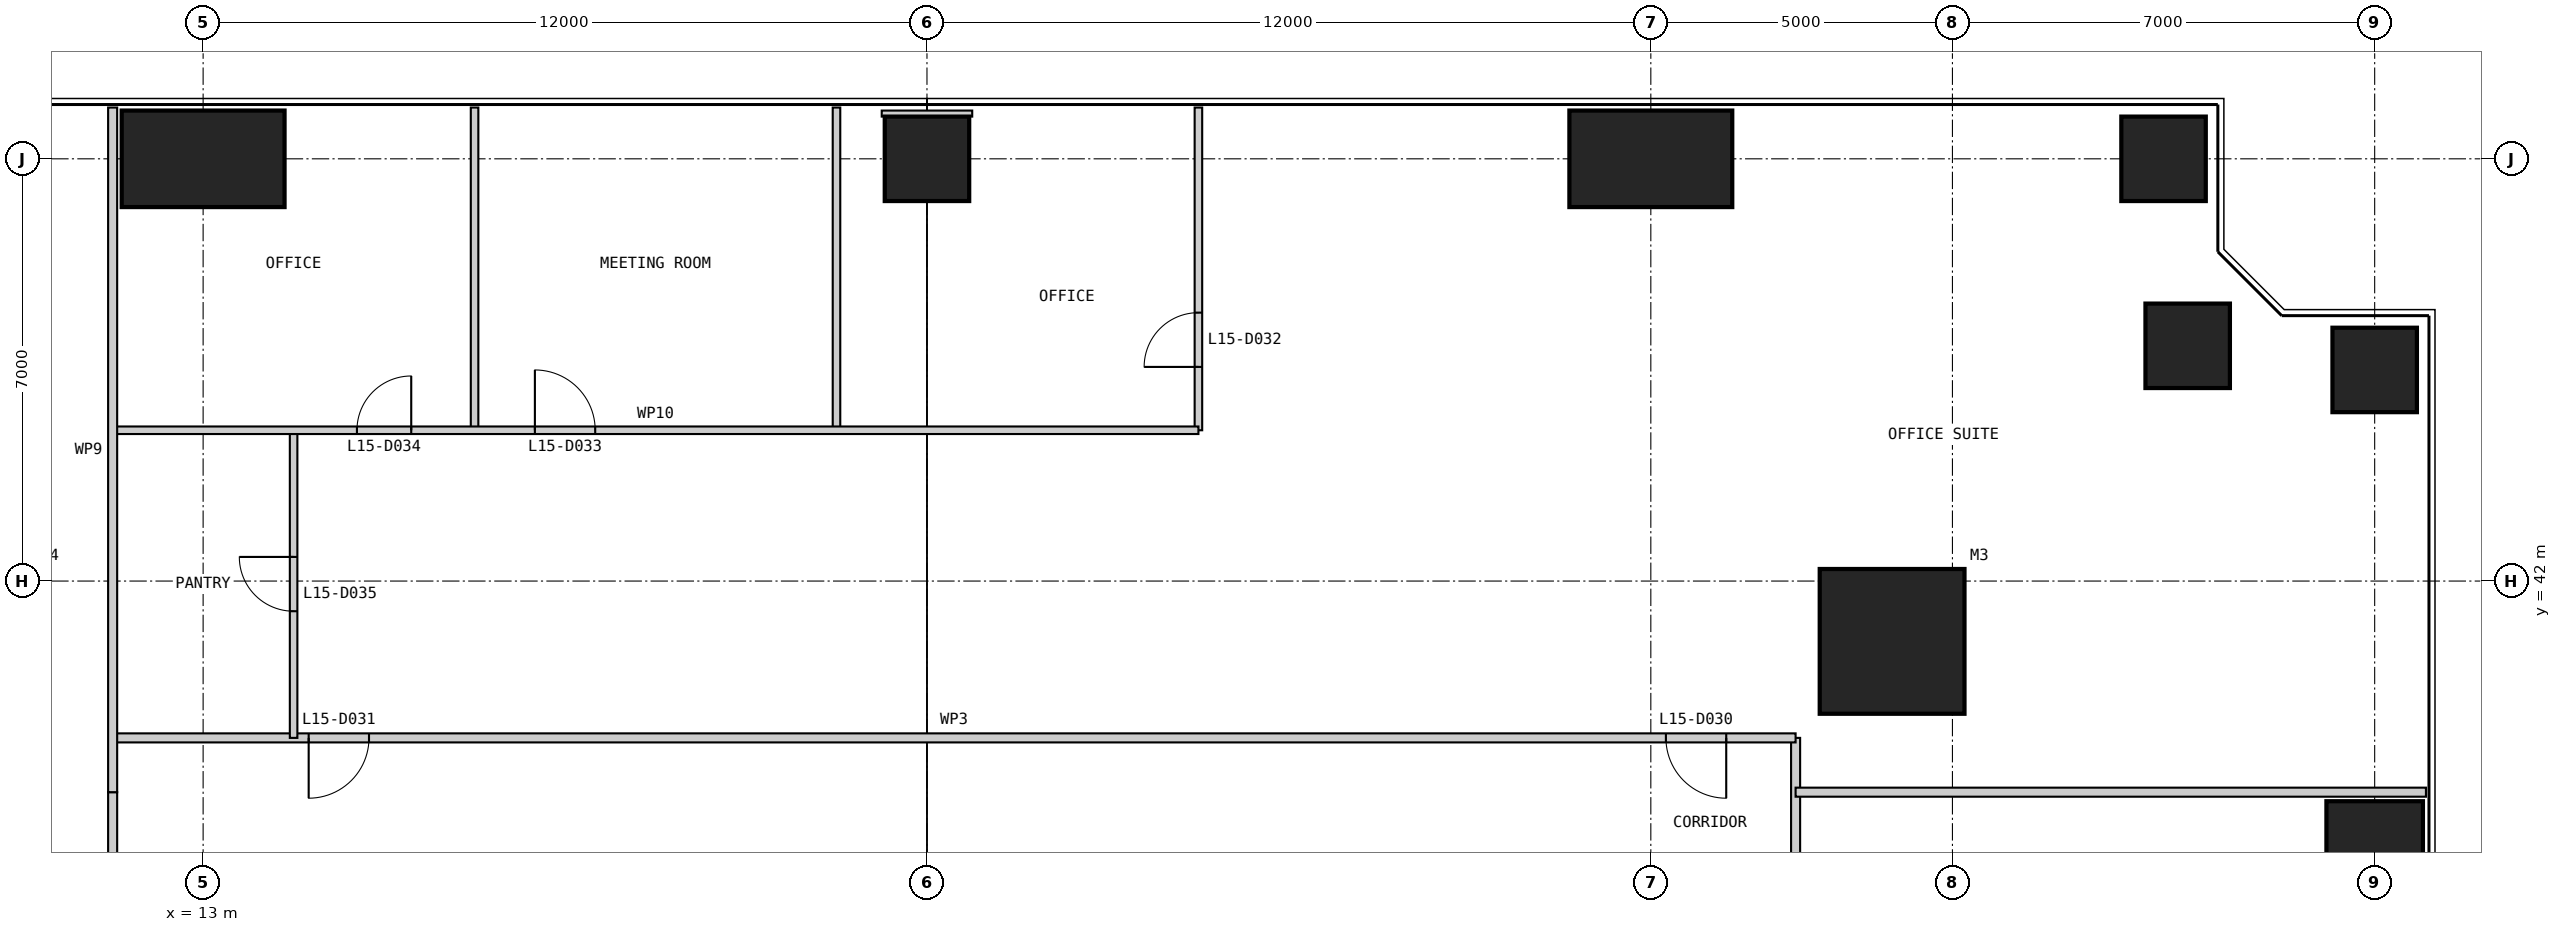
"""IFC4 building model, lengths in metres.
Left out: names, types, materials, properties, quantities, classifications, styles, units other than length and angle.
Written with IfcOpenShell. Run it as: python <this file> out.ifc"""

import sys

from ifc_helpers import new_model, si_unit, direction, frame, frame_2d, origin, origin_2d, place, context, subcontext, project, spatial, rectangle, extrude, element, fill, save


model = new_model("IFC4")
c1 = context("Model", 3, precision=1e-05, world=origin(), true_north=direction((0.0, 1.0)))
c2 = subcontext(c1, "Body", "Model", "MODEL_VIEW")
j1 = project(units=[si_unit("LENGTHUNIT", "METRE"), si_unit("PLANEANGLEUNIT", "RADIAN")], contexts=[c1])
p1 = place(None, origin())
s1 = spatial("IfcSite", under=j1, at=p1, CompositionType="ELEMENT")
p2 = place(p1, origin())
s2 = spatial("IfcBuilding", under=s1, at=p2, CompositionType="ELEMENT")
p3 = place(p2, frame((0.0, 0.0, 67.0)))
s3 = spatial("IfcBuildingStorey", under=s2, at=p3, CompositionType="ELEMENT", Elevation=67.0)
p4 = place(p3, frame((41.0, 41.0, 0.0), z_axis=(0.0, 0.0, 1.0), x_axis=(1.0, 0.0, 0.0)))
e1 = element("IfcColumn", 1, at=p4, inside=s3, PredefinedType="COLUMN", context=c2, shape_type="SweptSolid", body=[
    extrude(rectangle(XDim=2.4, YDim=2.4, at=origin_2d()), origin(), (0.0, 0.0, 1.0), 4.0),
])
p5 = place(p3, frame((49.0, 37.0, 0.0), z_axis=(0.0, 0.0, 1.0), x_axis=(1.0, 0.0, 0.0)))
e2 = element("IfcColumn", 2, at=p5, inside=s3, PredefinedType="COLUMN", context=c2, shape_type="SweptSolid", body=[
    extrude(rectangle(XDim=1.6, YDim=2.7, at=origin_2d()), origin(), (0.0, 0.0, 1.0), 4.0),
])
for number, where, z_axis, x_axis in (
    (3, (49.0, 45.5, 0.0), (0.0, 0.0, 1.0), (1.0, 0.0, 0.0)),
    (4, (45.9, 45.9, 0.0), (0.0, 0.0, 1.0), (1.0, 0.0, 0.0)),
    (5, (45.5, 49.0, 0.0), (0.0, 0.0, 1.0), (1.0, 0.0, 0.0)),
):
    element("IfcColumn", number, at=place(p3, frame(where, z_axis=z_axis, x_axis=x_axis)), inside=s3, PredefinedType="COLUMN", context=c2, shape_type="SweptSolid", body=[
        extrude(rectangle(XDim=1.4, YDim=1.4, at=origin_2d()), origin(), (0.0, 0.0, 1.0), 4.0),
    ])
p6 = place(p3, frame((37.0, 49.0, 0.0), z_axis=(0.0, 0.0, 1.0), x_axis=(1.0, 0.0, 0.0)))
e6 = element("IfcColumn", 6, at=p6, inside=s3, PredefinedType="COLUMN", context=c2, shape_type="SweptSolid", body=[
    extrude(rectangle(XDim=2.7, YDim=1.6, at=origin_2d()), origin(), (0.0, 0.0, 1.0), 4.0),
])
p7 = place(p3, frame((25.0, 49.0, 0.0), z_axis=(0.0, 0.0, 1.0), x_axis=(1.0, 0.0, 0.0)))
e7 = element("IfcColumn", 7, at=p7, inside=s3, PredefinedType="COLUMN", context=c2, shape_type="SweptSolid", body=[
    extrude(rectangle(XDim=1.4, YDim=1.4, at=origin_2d()), origin(), (0.0, 0.0, 1.0), 4.0),
])
p8 = place(p3, frame((13.0, 49.0, 0.0), z_axis=(0.0, 0.0, 1.0), x_axis=(1.0, 0.0, 0.0)))
e8 = element("IfcColumn", 8, at=p8, inside=s3, PredefinedType="COLUMN", context=c2, shape_type="SweptSolid", body=[
    extrude(rectangle(XDim=2.7, YDim=1.6, at=origin_2d()), origin(), (0.0, 0.0, 1.0), 4.0),
])
p9 = place(p3, frame((39.4, 11.5, 0.0), z_axis=(0.0, 0.0, 1.0), x_axis=(0.0, 1.0, 0.0)))
e9 = element("IfcWall", 9, at=p9, inside=s3, PredefinedType="PARTITIONING", context=c2, shape_type="SweptSolid", body=[
    extrude(rectangle(XDim=27.9, YDim=0.15, at=frame_2d((13.95, 0.0))), origin(), (0.0, 0.0, 1.0), 3.85),
])
p10 = place(p9, frame((2.5, 0.0, 0.0)))
e10 = element("IfcOpeningElement", 10, at=p10, cuts=e9, PredefinedType="OPENING", context=c2, shape_type="SweptSolid", body=[
    extrude(rectangle(XDim=1.0, YDim=2.2, at=frame_2d((0.5, 1.1))), frame((0.0, 0.085, 0.0), z_axis=(0.0, -1.0, 0.0), x_axis=(1.0, 0.0, 0.0)), (0.0, 0.0, 1.0), 0.17),
])
p11 = place(p9, frame((9.25, 0.0, 0.0)))
e11 = element("IfcOpeningElement", 11, at=p11, cuts=e9, PredefinedType="OPENING", context=c2, shape_type="SweptSolid", body=[
    extrude(rectangle(XDim=1.0, YDim=2.2, at=frame_2d((0.5, 1.1))), frame((0.0, 0.085, 0.0), z_axis=(0.0, -1.0, 0.0), x_axis=(1.0, 0.0, 0.0)), (0.0, 0.0, 1.0), 0.17),
])
p12 = place(p9, frame((16.75, 0.0, 0.0)))
e12 = element("IfcOpeningElement", 12, at=p12, cuts=e9, PredefinedType="OPENING", context=c2, shape_type="SweptSolid", body=[
    extrude(rectangle(XDim=1.0, YDim=2.2, at=frame_2d((0.5, 1.1))), frame((0.0, 0.085, 0.0), z_axis=(0.0, -1.0, 0.0), x_axis=(1.0, 0.0, 0.0)), (0.0, 0.0, 1.0), 0.17),
])
p13 = place(p9, frame((23.5, 0.0, 0.0)))
e13 = element("IfcOpeningElement", 13, at=p13, cuts=e9, PredefinedType="OPENING", context=c2, shape_type="SweptSolid", body=[
    extrude(rectangle(XDim=1.0, YDim=2.2, at=frame_2d((0.5, 1.1))), frame((0.0, 0.085, 0.0), z_axis=(0.0, -1.0, 0.0), x_axis=(1.0, 0.0, 0.0)), (0.0, 0.0, 1.0), 0.17),
])
p14 = place(p3, frame((39.4, 39.4, 0.0), z_axis=(0.0, 0.0, 1.0), x_axis=(-1.0, 0.0, 0.0)))
e14 = element("IfcWall", 14, at=p14, inside=s3, PredefinedType="PARTITIONING", context=c2, shape_type="SweptSolid", body=[
    extrude(rectangle(XDim=27.9, YDim=0.15, at=frame_2d((13.95, 0.0))), origin(), (0.0, 0.0, 1.0), 3.85),
])
p15 = place(p14, frame((1.15, 0.0, 0.0)))
e15 = element("IfcOpeningElement", 15, at=p15, cuts=e14, PredefinedType="OPENING", context=c2, shape_type="SweptSolid", body=[
    extrude(rectangle(XDim=1.0, YDim=2.2, at=frame_2d((0.5, 1.1))), frame((0.0, 0.085, 0.0), z_axis=(0.0, -1.0, 0.0), x_axis=(1.0, 0.0, 0.0)), (0.0, 0.0, 1.0), 0.17),
])
p16 = place(p14, frame((23.65, 0.0, 0.0)))
e16 = element("IfcOpeningElement", 16, at=p16, cuts=e14, PredefinedType="OPENING", context=c2, shape_type="SweptSolid", body=[
    extrude(rectangle(XDim=1.0, YDim=2.2, at=frame_2d((0.5, 1.1))), frame((0.0, 0.085, 0.0), z_axis=(0.0, -1.0, 0.0), x_axis=(1.0, 0.0, 0.0)), (0.0, 0.0, 1.0), 0.17),
])
p17 = place(p3, frame((49.85, 38.5, 0.0), z_axis=(0.0, 0.0, 1.0), x_axis=(-1.0, 0.0, 0.0)))
e17 = element("IfcWall", 17, at=p17, inside=s3, PredefinedType="PARTITIONING", context=c2, shape_type="SweptSolid", body=[
    extrude(rectangle(XDim=10.45, YDim=0.15, at=frame_2d((5.225, 0.0))), origin(), (0.0, 0.0, 1.0), 3.85),
])
p18 = place(p3, frame((29.5, 49.85, 0.0), z_axis=(0.0, 0.0, 1.0), x_axis=(0.0, -1.0, 0.0)))
e18 = element("IfcWall", 18, at=p18, inside=s3, PredefinedType="PARTITIONING", context=c2, shape_type="SweptSolid", body=[
    extrude(rectangle(XDim=5.35, YDim=0.125, at=frame_2d((2.675, 0.0))), origin(), (0.0, 0.0, 1.0), 3.85),
])
p19 = place(p18, frame((3.4, 0.0, 0.0)))
e19 = element("IfcOpeningElement", 19, at=p19, cuts=e18, PredefinedType="OPENING", context=c2, shape_type="SweptSolid", body=[
    extrude(rectangle(XDim=0.9, YDim=2.2, at=frame_2d((0.45, 1.1))), frame((0.0, 0.073, 0.0), z_axis=(0.0, -1.0, 0.0), x_axis=(1.0, 0.0, 0.0)), (0.0, 0.0, 1.0), 0.145),
])
for number, where, z_axis, x_axis in (
    (20, (23.5, 49.85, 0.0), (0.0, 0.0, 1.0), (0.0, -1.0, 0.0)),
    (21, (17.5, 49.85, 0.0), (0.0, 0.0, 1.0), (0.0, -1.0, 0.0)),
):
    element("IfcWall", number, at=place(p3, frame(where, z_axis=z_axis, x_axis=x_axis)), inside=s3, PredefinedType="PARTITIONING", context=c2, shape_type="SweptSolid", body=[
        extrude(rectangle(XDim=5.35, YDim=0.125, at=frame_2d((2.675, 0.0))), origin(), (0.0, 0.0, 1.0), 3.85),
    ])
p20 = place(p3, frame((14.5, 44.5, 0.0), z_axis=(0.0, 0.0, 1.0), x_axis=(0.0, -1.0, 0.0)))
e22 = element("IfcWall", 22, at=p20, inside=s3, PredefinedType="PARTITIONING", context=c2, shape_type="SweptSolid", body=[
    extrude(rectangle(XDim=5.1, YDim=0.125, at=frame_2d((2.55, 0.0))), origin(), (0.0, 0.0, 1.0), 3.85),
])
p21 = place(p20, frame((2.1, 0.0, 0.0)))
e23 = element("IfcOpeningElement", 23, at=p21, cuts=e22, PredefinedType="OPENING", context=c2, shape_type="SweptSolid", body=[
    extrude(rectangle(XDim=0.9, YDim=2.2, at=frame_2d((0.45, 1.1))), frame((0.0, 0.073, 0.0), z_axis=(0.0, -1.0, 0.0), x_axis=(1.0, 0.0, 0.0)), (0.0, 0.0, 1.0), 0.145),
])
p22 = place(p3, frame((29.5, 44.5, 0.0), z_axis=(0.0, 0.0, 1.0), x_axis=(-1.0, 0.0, 0.0)))
e24 = element("IfcWall", 24, at=p22, inside=s3, PredefinedType="PARTITIONING", context=c2, shape_type="SweptSolid", body=[
    extrude(rectangle(XDim=18.0, YDim=0.125, at=frame_2d((9.0, 0.0))), origin(), (0.0, 0.0, 1.0), 3.85),
])
p23 = place(p22, frame((10.0, 0.0, 0.0)))
e25 = element("IfcOpeningElement", 25, at=p23, cuts=e24, PredefinedType="OPENING", context=c2, shape_type="SweptSolid", body=[
    extrude(rectangle(XDim=1.0, YDim=2.2, at=frame_2d((0.5, 1.1))), frame((0.0, 0.073, 0.0), z_axis=(0.0, -1.0, 0.0), x_axis=(1.0, 0.0, 0.0)), (0.0, 0.0, 1.0), 0.145),
])
p24 = place(p22, frame((13.05, 0.0, 0.0)))
e26 = element("IfcOpeningElement", 26, at=p24, cuts=e24, PredefinedType="OPENING", context=c2, shape_type="SweptSolid", body=[
    extrude(rectangle(XDim=0.9, YDim=2.2, at=frame_2d((0.45, 1.1))), frame((0.0, 0.073, 0.0), z_axis=(0.0, -1.0, 0.0), x_axis=(1.0, 0.0, 0.0)), (0.0, 0.0, 1.0), 0.145),
])
p25 = place(p3, frame((11.5, 38.5, 0.0), z_axis=(0.0, 0.0, 1.0), x_axis=(0.0, -1.0, 0.0)))
e27 = element("IfcWall", 27, at=p25, inside=s3, PredefinedType="PARTITIONING", context=c2, shape_type="SweptSolid", body=[
    extrude(rectangle(XDim=27.0, YDim=0.15, at=frame_2d((13.5, 0.0))), origin(), (0.0, 0.0, 1.0), 3.85),
])
p26 = place(p25, frame((4.0, 0.0, 0.0)))
e28 = element("IfcOpeningElement", 28, at=p26, cuts=e27, PredefinedType="OPENING", context=c2, shape_type="SweptSolid", body=[
    extrude(rectangle(XDim=1.0, YDim=2.2, at=frame_2d((0.5, 1.1))), frame((0.0, 0.085, 0.0), z_axis=(0.0, -1.0, 0.0), x_axis=(1.0, 0.0, 0.0)), (0.0, 0.0, 1.0), 0.17),
])
p27 = place(p25, frame((10.0, 0.0, 0.0)))
e29 = element("IfcOpeningElement", 29, at=p27, cuts=e27, PredefinedType="OPENING", context=c2, shape_type="SweptSolid", body=[
    extrude(rectangle(XDim=1.0, YDim=2.2, at=frame_2d((0.5, 1.1))), frame((0.0, 0.085, 0.0), z_axis=(0.0, -1.0, 0.0), x_axis=(1.0, 0.0, 0.0)), (0.0, 0.0, 1.0), 0.17),
])
p28 = place(p25, frame((17.5, 0.0, 0.0)))
e30 = element("IfcOpeningElement", 30, at=p28, cuts=e27, PredefinedType="OPENING", context=c2, shape_type="SweptSolid", body=[
    extrude(rectangle(XDim=1.0, YDim=2.2, at=frame_2d((0.5, 1.1))), frame((0.0, 0.085, 0.0), z_axis=(0.0, -1.0, 0.0), x_axis=(1.0, 0.0, 0.0)), (0.0, 0.0, 1.0), 0.17),
])
p29 = place(p25, frame((23.5, 0.0, 0.0)))
e31 = element("IfcOpeningElement", 31, at=p29, cuts=e27, PredefinedType="OPENING", context=c2, shape_type="SweptSolid", body=[
    extrude(rectangle(XDim=1.0, YDim=2.2, at=frame_2d((0.5, 1.1))), frame((0.0, 0.085, 0.0), z_axis=(0.0, -1.0, 0.0), x_axis=(1.0, 0.0, 0.0)), (0.0, 0.0, 1.0), 0.17),
])
p30 = place(p3, frame((11.5, 49.85, 0.0), z_axis=(0.0, 0.0, 1.0), x_axis=(0.0, -1.0, 0.0)))
e32 = element("IfcWall", 32, at=p30, inside=s3, PredefinedType="PARTITIONING", context=c2, shape_type="SweptSolid", body=[
    extrude(rectangle(XDim=11.35, YDim=0.15, at=frame_2d((5.675, 0.0))), origin(), (0.0, 0.0, 1.0), 3.85),
])
p31 = place(p3, frame((25.0, 49.8, 0.0), z_axis=(0.0, 0.0, 1.0), x_axis=(0.0, -1.0, 0.0)))
e33 = element("IfcWall", 33, at=p31, inside=s3, PredefinedType="PARTITIONING", context=c2, shape_type="SweptSolid", body=[
    extrude(rectangle(XDim=0.1, YDim=1.5, at=frame_2d((0.05, 0.0))), origin(), (0.0, 0.0, 1.0), 3.85),
])
p32 = place(p15, origin())
e34 = element("IfcDoor", 34, at=p32, inside=s3, OperationType="SINGLE_SWING_LEFT", PredefinedType="DOOR", context=c2, shape_type="SweptSolid", body=[
    extrude(rectangle(XDim=1.0, YDim=2.2, at=frame_2d((0.5, 1.1))), frame((0.0, 0.025, 0.0), z_axis=(0.0, -1.0, 0.0), x_axis=(1.0, 0.0, 0.0)), (0.0, 0.0, 1.0), 0.05),
])
fill(e15, e34)
p33 = place(p16, origin())
e35 = element("IfcDoor", 35, at=p33, inside=s3, OperationType="SINGLE_SWING_RIGHT", PredefinedType="DOOR", context=c2, shape_type="SweptSolid", body=[
    extrude(rectangle(XDim=1.0, YDim=2.2, at=frame_2d((0.5, 1.1))), frame((0.0, 0.025, 0.0), z_axis=(0.0, -1.0, 0.0), x_axis=(1.0, 0.0, 0.0)), (0.0, 0.0, 1.0), 0.05),
])
fill(e16, e35)
p34 = place(p19, frame((0.9, 0.0, 0.0), z_axis=(0.0, 0.0, 1.0), x_axis=(-1.0, 0.0, 0.0)))
e36 = element("IfcDoor", 36, at=p34, inside=s3, OperationType="SINGLE_SWING_LEFT", PredefinedType="DOOR", context=c2, shape_type="SweptSolid", body=[
    extrude(rectangle(XDim=0.9, YDim=2.2, at=frame_2d((0.45, 1.1))), frame((0.0, 0.025, 0.0), z_axis=(0.0, -1.0, 0.0), x_axis=(1.0, 0.0, 0.0)), (0.0, 0.0, 1.0), 0.05),
])
fill(e19, e36)
p35 = place(p23, frame((1.0, 0.0, 0.0), z_axis=(0.0, 0.0, 1.0), x_axis=(-1.0, 0.0, 0.0)))
e37 = element("IfcDoor", 37, at=p35, inside=s3, OperationType="SINGLE_SWING_LEFT", PredefinedType="DOOR", context=c2, shape_type="SweptSolid", body=[
    extrude(rectangle(XDim=1.0, YDim=2.2, at=frame_2d((0.5, 1.1))), frame((0.0, 0.025, 0.0), z_axis=(0.0, -1.0, 0.0), x_axis=(1.0, 0.0, 0.0)), (0.0, 0.0, 1.0), 0.05),
])
fill(e25, e37)
p36 = place(p24, frame((0.9, 0.0, 0.0), z_axis=(0.0, 0.0, 1.0), x_axis=(-1.0, 0.0, 0.0)))
e38 = element("IfcDoor", 38, at=p36, inside=s3, OperationType="SINGLE_SWING_RIGHT", PredefinedType="DOOR", context=c2, shape_type="SweptSolid", body=[
    extrude(rectangle(XDim=0.9, YDim=2.2, at=frame_2d((0.45, 1.1))), frame((0.0, 0.025, 0.0), z_axis=(0.0, -1.0, 0.0), x_axis=(1.0, 0.0, 0.0)), (0.0, 0.0, 1.0), 0.05),
])
fill(e26, e38)
p37 = place(p21, frame((0.9, 0.0, 0.0), z_axis=(0.0, 0.0, 1.0), x_axis=(-1.0, 0.0, 0.0)))
e39 = element("IfcDoor", 39, at=p37, inside=s3, OperationType="SINGLE_SWING_RIGHT", PredefinedType="DOOR", context=c2, shape_type="SweptSolid", body=[
    extrude(rectangle(XDim=0.9, YDim=2.2, at=frame_2d((0.45, 1.1))), frame((0.0, 0.025, 0.0), z_axis=(0.0, -1.0, 0.0), x_axis=(1.0, 0.0, 0.0)), (0.0, 0.0, 1.0), 0.05),
])
fill(e23, e39)
save(model, sys.argv[1])
